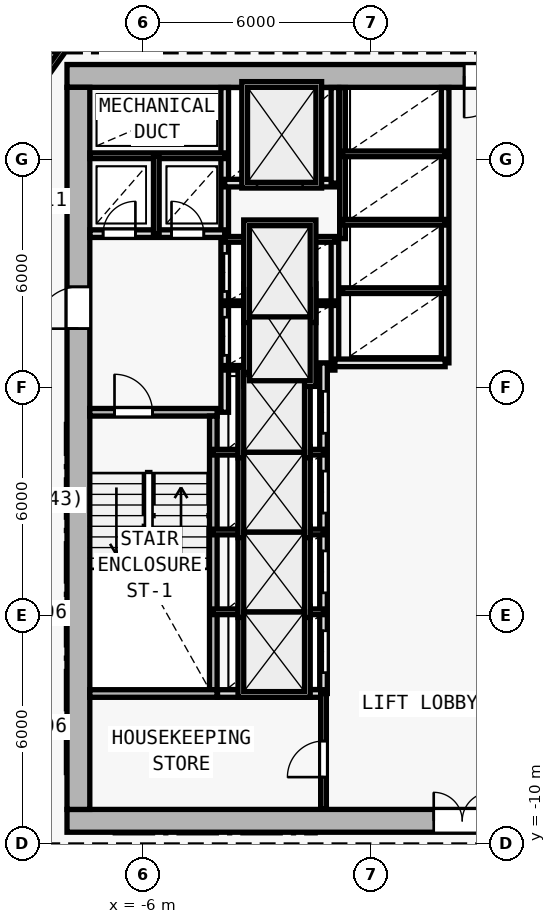
"""IFC4 building model, lengths in metres.
Left out: names, types, materials, properties, quantities, classifications, styles, units other than length and angle.
Written with IfcOpenShell. Run it as: python <this file> out.ifc"""

import sys

from ifc_helpers import new_model, si_unit, direction, frame, frame_2d, origin, origin_2d, place, context, subcontext, project, spatial, rectangle, i_section, extrude, element, fill, save


model = new_model("IFC4")
c1 = context("Model", 3, precision=1e-05, world=origin(), true_north=direction((0.0, 1.0)))
c2 = subcontext(c1, "Body", "Model", "MODEL_VIEW")
j1 = project(units=[si_unit("LENGTHUNIT", "METRE"), si_unit("PLANEANGLEUNIT", "RADIAN")], contexts=[c1])
p1 = place(None, origin())
s1 = spatial("IfcSite", under=j1, at=p1, CompositionType="ELEMENT")
p2 = place(p1, origin())
s2 = spatial("IfcBuilding", under=s1, at=p2, CompositionType="ELEMENT")
p3 = place(p2, frame((0.0, 0.0, 96.9)))
s3 = spatial("IfcBuildingStorey", under=s2, at=p3, CompositionType="ELEMENT", Elevation=96.9)
for number, where, z_axis, x_axis in (
    (1, (-7.7, -9.4, 0.0), (0.0, 0.0, 1.0), (1.0, 0.0, 0.0)),
    (2, (-7.7, 10.2, 0.0), (0.0, 0.0, 1.0), (1.0, 0.0, 0.0)),
    (3, (0.0, -9.4, 0.0), (0.0, 0.0, 1.0), (1.0, 0.0, 0.0)),
    (4, (-7.7, 2.0, 0.0), (0.0, 0.0, 1.0), (1.0, 0.0, 0.0)),
):
    element("IfcColumn", number, at=place(p3, frame(where, z_axis=z_axis, x_axis=x_axis)), inside=s3, PredefinedType="COLUMN", context=c2, shape_type="SweptSolid", body=[
        extrude(i_section(OverallWidth=0.409, OverallDepth=0.425, WebThickness=0.021, FlangeThickness=0.034, FilletRadius=0.015, at=origin_2d()), origin(), (0.0, 0.0, 1.0), 3.6),
    ])
p4 = place(p3, frame((-8.0, -9.4, 0.0), z_axis=(0.0, 0.0, 1.0), x_axis=(1.0, 0.0, 0.0)))
e5 = element("IfcWall", 5, at=p4, inside=s3, PredefinedType="SHEAR", context=c2, shape_type="SweptSolid", body=[
    extrude(rectangle(XDim=16.0, YDim=0.6, at=frame_2d((8.0, 0.0))), origin(), (0.0, 0.0, 1.0), 3.35),
])
p5 = place(p4, frame((9.65, 0.0, 0.0)))
e6 = element("IfcOpeningElement", 6, at=p5, cuts=e5, PredefinedType="OPENING", context=c2, shape_type="SweptSolid", body=[
    extrude(rectangle(XDim=1.5, YDim=2.2, at=frame_2d((0.75, 1.1))), frame((0.0, 0.31, 0.0), z_axis=(0.0, -1.0, 0.0), x_axis=(1.0, 0.0, 0.0)), (0.0, 0.0, 1.0), 0.62),
])
p6 = place(p3, frame((8.0, 10.2, 0.0), z_axis=(0.0, 0.0, 1.0), x_axis=(-1.0, 0.0, 0.0)))
e7 = element("IfcWall", 7, at=p6, inside=s3, PredefinedType="SHEAR", context=c2, shape_type="SweptSolid", body=[
    extrude(rectangle(XDim=16.0, YDim=0.6, at=frame_2d((8.0, 0.0))), origin(), (0.0, 0.0, 1.0), 3.35),
])
p7 = place(p6, frame((4.45, 0.0, 0.0)))
e8 = element("IfcOpeningElement", 8, at=p7, cuts=e7, PredefinedType="OPENING", context=c2, shape_type="SweptSolid", body=[
    extrude(rectangle(XDim=1.1, YDim=2.15, at=frame_2d((0.55, 1.075))), frame((0.0, 0.31, 0.0), z_axis=(0.0, -1.0, 0.0), x_axis=(1.0, 0.0, 0.0)), (0.0, 0.0, 1.0), 0.62),
])
p8 = place(p3, frame((-7.7, -9.1, 0.0), z_axis=(0.0, 0.0, 1.0), x_axis=(0.0, 1.0, 0.0)))
e9 = element("IfcWall", 9, at=p8, inside=s3, PredefinedType="SHEAR", context=c2, shape_type="SweptSolid", body=[
    extrude(rectangle(XDim=19.0, YDim=0.6, at=frame_2d((9.5, 0.0))), origin(), (0.0, 0.0, 1.0), 3.35),
])
p9 = place(p8, frame((12.65, 0.0, 0.0)))
e10 = element("IfcOpeningElement", 10, at=p9, cuts=e9, PredefinedType="OPENING", context=c2, shape_type="SweptSolid", body=[
    extrude(rectangle(XDim=1.1, YDim=2.15, at=frame_2d((0.55, 1.075))), frame((0.0, 0.31, 0.0), z_axis=(0.0, -1.0, 0.0), x_axis=(1.0, 0.0, 0.0)), (0.0, 0.0, 1.0), 0.62),
])
p10 = place(p3, frame((-7.4, 1.35, 0.0), z_axis=(0.0, 0.0, 1.0), x_axis=(1.0, 0.0, 0.0)))
e11 = element("IfcWall", 11, at=p10, inside=s3, PredefinedType="SOLIDWALL", context=c2, shape_type="SweptSolid", body=[
    extrude(rectangle(XDim=3.35, YDim=0.2, at=frame_2d((1.675, 0.0))), origin(), (0.0, 0.0, 1.0), 3.35),
])
p11 = place(p10, frame((0.65, 0.0, 0.0)))
e12 = element("IfcOpeningElement", 12, at=p11, cuts=e11, PredefinedType="OPENING", context=c2, shape_type="SweptSolid", body=[
    extrude(rectangle(XDim=1.0, YDim=2.15, at=frame_2d((0.5, 1.075))), frame((0.0, 0.11, 0.0), z_axis=(0.0, -1.0, 0.0), x_axis=(1.0, 0.0, 0.0)), (0.0, 0.0, 1.0), 0.22),
])
p12 = place(p3, frame((-4.15, -5.95, 0.0), z_axis=(0.0, 0.0, 1.0), x_axis=(0.0, 1.0, 0.0)))
e13 = element("IfcWall", 13, at=p12, inside=s3, PredefinedType="SOLIDWALL", context=c2, shape_type="SweptSolid", body=[
    extrude(rectangle(XDim=7.2, YDim=0.2, at=frame_2d((3.6, 0.0))), origin(), (0.0, 0.0, 1.0), 3.35),
])
p13 = place(p3, frame((-3.85, 1.35, 0.0), z_axis=(0.0, 0.0, 1.0), x_axis=(0.0, 1.0, 0.0)))
e14 = element("IfcWall", 14, at=p13, inside=s3, PredefinedType="SOLIDWALL", context=c2, shape_type="SweptSolid", body=[
    extrude(rectangle(XDim=8.545, YDim=0.2, at=frame_2d((4.272, 0.0))), origin(), (0.0, 0.0, 1.0), 3.35),
])
p14 = place(p13, frame((1.5, 0.0, 0.0)))
e15 = element("IfcOpeningElement", 15, at=p14, cuts=e14, PredefinedType="OPENING", context=c2, shape_type="SweptSolid", body=[
    extrude(rectangle(XDim=1.0, YDim=2.15, at=frame_2d((0.5, 1.075))), frame((0.0, 0.11, 0.0), z_axis=(0.0, -1.0, 0.0), x_axis=(1.0, 0.0, 0.0)), (0.0, 0.0, 1.0), 0.22),
])
p15 = place(p13, frame((3.18, 0.0, 0.0)))
e16 = element("IfcOpeningElement", 16, at=p15, cuts=e14, PredefinedType="OPENING", context=c2, shape_type="SweptSolid", body=[
    extrude(rectangle(XDim=1.0, YDim=2.15, at=frame_2d((0.5, 1.075))), frame((0.0, 0.11, 0.0), z_axis=(0.0, -1.0, 0.0), x_axis=(1.0, 0.0, 0.0)), (0.0, 0.0, 1.0), 0.22),
])
p16 = place(p3, frame((-7.395, 6.05, 0.0), z_axis=(0.0, 0.0, 1.0), x_axis=(1.0, 0.0, 0.0)))
e17 = element("IfcWall", 17, at=p16, inside=s3, PredefinedType="SOLIDWALL", context=c2, shape_type="SweptSolid", body=[
    extrude(rectangle(XDim=3.545, YDim=0.2, at=frame_2d((1.772, 0.0))), origin(), (0.0, 0.0, 1.0), 3.35),
])
p17 = place(p16, frame((0.345, 0.0, 0.0)))
e18 = element("IfcOpeningElement", 18, at=p17, cuts=e17, PredefinedType="OPENING", context=c2, shape_type="SweptSolid", body=[
    extrude(rectangle(XDim=0.85, YDim=2.1, at=frame_2d((0.425, 1.05))), frame((0.0, 0.11, 0.0), z_axis=(0.0, -1.0, 0.0), x_axis=(1.0, 0.0, 0.0)), (0.0, 0.0, 1.0), 0.22),
])
p18 = place(p16, frame((2.145, 0.0, 0.0)))
e19 = element("IfcOpeningElement", 19, at=p18, cuts=e17, PredefinedType="OPENING", context=c2, shape_type="SweptSolid", body=[
    extrude(rectangle(XDim=0.85, YDim=2.1, at=frame_2d((0.425, 1.05))), frame((0.0, 0.11, 0.0), z_axis=(0.0, -1.0, 0.0), x_axis=(1.0, 0.0, 0.0)), (0.0, 0.0, 1.0), 0.22),
])
p19 = place(p3, frame((-7.395, 8.1, 0.0), z_axis=(0.0, 0.0, 1.0), x_axis=(1.0, 0.0, 0.0)))
e20 = element("IfcWall", 20, at=p19, inside=s3, PredefinedType="PARTITIONING", context=c2, shape_type="SweptSolid", body=[
    extrude(rectangle(XDim=3.545, YDim=0.15, at=frame_2d((1.772, 0.0))), origin(), (0.0, 0.0, 1.0), 3.35),
])
p20 = place(p3, frame((-5.65, 6.05, 0.0), z_axis=(0.0, 0.0, 1.0), x_axis=(0.0, 1.0, 0.0)))
e21 = element("IfcWall", 21, at=p20, inside=s3, PredefinedType="PARTITIONING", context=c2, shape_type="SweptSolid", body=[
    extrude(rectangle(XDim=2.05, YDim=0.15, at=frame_2d((1.025, 0.0))), origin(), (0.0, 0.0, 1.0), 3.35),
])
p21 = place(p3, frame((-0.95, 2.65, 0.0), z_axis=(0.0, 0.0, 1.0), x_axis=(0.0, 1.0, 0.0)))
e22 = element("IfcWall", 22, at=p21, inside=s3, PredefinedType="SOLIDWALL", context=c2, shape_type="SweptSolid", body=[
    extrude(rectangle(XDim=3.27, YDim=0.2, at=frame_2d((1.635, 0.0))), origin(), (0.0, 0.0, 1.0), 3.35),
])
for number, where, z_axis, x_axis in (
    (23, (-3.85, 2.52, 0.0), (0.0, 0.0, 1.0), (1.0, 0.0, 0.0)),
    (24, (-3.85, 4.22, 0.0), (0.0, 0.0, 1.0), (1.0, 0.0, 0.0)),
):
    element("IfcWall", number, at=place(p3, frame(where, z_axis=z_axis, x_axis=x_axis)), inside=s3, PredefinedType="PARTITIONING", context=c2, shape_type="SweptSolid", body=[
        extrude(rectangle(XDim=2.9, YDim=0.12, at=frame_2d((1.45, 0.0))), origin(), (0.0, 0.0, 1.0), 3.35),
    ])
p22 = place(p3, frame((-3.85, 5.9, 0.0), z_axis=(0.0, 0.0, 1.0), x_axis=(1.0, 0.0, 0.0)))
e25 = element("IfcWall", 25, at=p22, inside=s3, PredefinedType="PARTITIONING", context=c2, shape_type="SweptSolid", body=[
    extrude(rectangle(XDim=2.9, YDim=0.15, at=frame_2d((1.45, 0.0))), origin(), (0.0, 0.0, 1.0), 3.35),
])
p23 = place(p3, frame((-3.85, 7.38, 0.0), z_axis=(0.0, 0.0, 1.0), x_axis=(1.0, 0.0, 0.0)))
e26 = element("IfcWall", 26, at=p23, inside=s3, PredefinedType="SOLIDWALL", context=c2, shape_type="SweptSolid", body=[
    extrude(rectangle(XDim=2.9, YDim=0.2, at=frame_2d((1.45, 0.0))), origin(), (0.0, 0.0, 1.0), 3.35),
])
p24 = place(p23, frame((0.85, 0.0, 0.0)))
e27 = element("IfcOpeningElement", 27, at=p24, cuts=e26, PredefinedType="OPENING", context=c2, shape_type="SweptSolid", body=[
    extrude(rectangle(XDim=1.2, YDim=2.2, at=frame_2d((0.6, 1.1))), frame((0.0, 0.11, 0.0), z_axis=(0.0, -1.0, 0.0), x_axis=(1.0, 0.0, 0.0)), (0.0, 0.0, 1.0), 0.22),
])
p25 = place(p3, frame((-0.95, 7.38, 0.0), z_axis=(0.0, 0.0, 1.0), x_axis=(0.0, 1.0, 0.0)))
e28 = element("IfcWall", 28, at=p25, inside=s3, PredefinedType="SOLIDWALL", context=c2, shape_type="SweptSolid", body=[
    extrude(rectangle(XDim=2.515, YDim=0.2, at=frame_2d((1.258, 0.0))), origin(), (0.0, 0.0, 1.0), 3.35),
])
p26 = place(p3, frame((-1.25, -6.05, 0.0), z_axis=(0.0, 0.0, 1.0), x_axis=(0.0, 1.0, 0.0)))
e29 = element("IfcWall", 29, at=p26, inside=s3, PredefinedType="SOLIDWALL", context=c2, shape_type="SweptSolid", body=[
    extrude(rectangle(XDim=8.7, YDim=0.2, at=frame_2d((4.35, 0.0))), origin(), (0.0, 0.0, 1.0), 3.35),
])
p27 = place(p26, frame((0.55, 0.0, 0.0)))
e30 = element("IfcOpeningElement", 30, at=p27, cuts=e29, PredefinedType="OPENING", context=c2, shape_type="SweptSolid", body=[
    extrude(rectangle(XDim=1.1, YDim=2.15, at=frame_2d((0.55, 1.075))), frame((0.0, 0.11, 0.0), z_axis=(0.0, -1.0, 0.0), x_axis=(1.0, 0.0, 0.0)), (0.0, 0.0, 1.0), 0.22),
])
p28 = place(p26, frame((2.65, 0.0, 0.0)))
e31 = element("IfcOpeningElement", 31, at=p28, cuts=e29, PredefinedType="OPENING", context=c2, shape_type="SweptSolid", body=[
    extrude(rectangle(XDim=1.1, YDim=2.15, at=frame_2d((0.55, 1.075))), frame((0.0, 0.11, 0.0), z_axis=(0.0, -1.0, 0.0), x_axis=(1.0, 0.0, 0.0)), (0.0, 0.0, 1.0), 0.22),
])
p29 = place(p26, frame((4.75, 0.0, 0.0)))
e32 = element("IfcOpeningElement", 32, at=p29, cuts=e29, PredefinedType="OPENING", context=c2, shape_type="SweptSolid", body=[
    extrude(rectangle(XDim=1.1, YDim=2.15, at=frame_2d((0.55, 1.075))), frame((0.0, 0.11, 0.0), z_axis=(0.0, -1.0, 0.0), x_axis=(1.0, 0.0, 0.0)), (0.0, 0.0, 1.0), 0.22),
])
p30 = place(p26, frame((6.85, 0.0, 0.0)))
e33 = element("IfcOpeningElement", 33, at=p30, cuts=e29, PredefinedType="OPENING", context=c2, shape_type="SweptSolid", body=[
    extrude(rectangle(XDim=1.1, YDim=2.15, at=frame_2d((0.55, 1.075))), frame((0.0, 0.11, 0.0), z_axis=(0.0, -1.0, 0.0), x_axis=(1.0, 0.0, 0.0)), (0.0, 0.0, 1.0), 0.22),
])
for number, where, z_axis, x_axis in (
    (34, (-4.15, -3.9, 0.0), (0.0, 0.0, 1.0), (1.0, 0.0, 0.0)),
    (35, (-4.15, -1.8, 0.0), (0.0, 0.0, 1.0), (1.0, 0.0, 0.0)),
    (36, (-4.15, 0.3, 0.0), (0.0, 0.0, 1.0), (1.0, 0.0, 0.0)),
):
    element("IfcWall", number, at=place(p3, frame(where, z_axis=z_axis, x_axis=x_axis)), inside=s3, PredefinedType="PARTITIONING", context=c2, shape_type="SweptSolid", body=[
        extrude(rectangle(XDim=2.9, YDim=0.15, at=frame_2d((1.45, 0.0))), origin(), (0.0, 0.0, 1.0), 3.35),
    ])
p31 = place(p3, frame((1.95, 2.65, 0.0), z_axis=(0.0, 0.0, 1.0), x_axis=(0.0, 1.0, 0.0)))
e37 = element("IfcWall", 37, at=p31, inside=s3, PredefinedType="SOLIDWALL", context=c2, shape_type="SweptSolid", body=[
    extrude(rectangle(XDim=7.245, YDim=0.2, at=frame_2d((3.623, 0.0))), origin(), (0.0, 0.0, 1.0), 3.35),
])
p32 = place(p3, frame((-0.95, 2.65, 0.0), z_axis=(0.0, 0.0, 1.0), x_axis=(1.0, 0.0, 0.0)))
e38 = element("IfcWall", 38, at=p32, inside=s3, PredefinedType="SOLIDWALL", context=c2, shape_type="SweptSolid", body=[
    extrude(rectangle(XDim=2.9, YDim=0.2, at=frame_2d((1.45, 0.0))), origin(), (0.0, 0.0, 1.0), 3.35),
])
p33 = place(p3, frame((-0.75, 5.92, 0.0), z_axis=(0.0, 0.0, 1.0), x_axis=(0.0, 1.0, 0.0)))
e39 = element("IfcWall", 39, at=p33, inside=s3, PredefinedType="PARTITIONING", context=c2, shape_type="SweptSolid", body=[
    extrude(rectangle(XDim=3.975, YDim=0.15, at=frame_2d((1.988, 0.0))), origin(), (0.0, 0.0, 1.0), 3.35),
])
for number, where, z_axis, x_axis in (
    (40, (-0.75, 4.55, 0.0), (0.0, 0.0, 1.0), (1.0, 0.0, 0.0)),
    (41, (-0.75, 6.35, 0.0), (0.0, 0.0, 1.0), (1.0, 0.0, 0.0)),
    (42, (-0.75, 8.15, 0.0), (0.0, 0.0, 1.0), (1.0, 0.0, 0.0)),
):
    element("IfcWall", number, at=place(p3, frame(where, z_axis=z_axis, x_axis=x_axis)), inside=s3, PredefinedType="PARTITIONING", context=c2, shape_type="SweptSolid", body=[
        extrude(rectangle(XDim=2.7, YDim=0.15, at=frame_2d((1.35, 0.0))), origin(), (0.0, 0.0, 1.0), 3.35),
    ])
p34 = place(p3, frame((-7.4, -6.05, 0.0), z_axis=(0.0, 0.0, 1.0), x_axis=(1.0, 0.0, 0.0)))
e43 = element("IfcWall", 43, at=p34, inside=s3, PredefinedType="SOLIDWALL", context=c2, shape_type="SweptSolid", body=[
    extrude(rectangle(XDim=3.35, YDim=0.2, at=frame_2d((1.675, 0.0))), origin(), (0.0, 0.0, 1.0), 3.35),
])
p35 = place(p3, frame((-4.04, -6.05, 0.0), z_axis=(0.0, 0.0, 1.0), x_axis=(1.0, 0.0, 0.0)))
e44 = element("IfcWall", 44, at=p35, inside=s3, PredefinedType="SOLIDWALL", context=c2, shape_type="SweptSolid", body=[
    extrude(rectangle(XDim=2.79, YDim=0.2, at=frame_2d((1.395, 0.0))), origin(), (0.0, 0.0, 1.0), 3.35),
])
p36 = place(p3, frame((-1.25, -9.095, 0.0), z_axis=(0.0, 0.0, 1.0), x_axis=(0.0, 1.0, 0.0)))
e45 = element("IfcWall", 45, at=p36, inside=s3, PredefinedType="PARTITIONING", context=c2, shape_type="SweptSolid", body=[
    extrude(rectangle(XDim=3.045, YDim=0.15, at=frame_2d((1.522, 0.0))), origin(), (0.0, 0.0, 1.0), 3.35),
])
p37 = place(p36, frame((0.845, 0.0, 0.0)))
e46 = element("IfcOpeningElement", 46, at=p37, cuts=e45, PredefinedType="OPENING", context=c2, shape_type="SweptSolid", body=[
    extrude(rectangle(XDim=0.95, YDim=2.1, at=frame_2d((0.475, 1.05))), frame((0.0, 0.085, 0.0), z_axis=(0.0, -1.0, 0.0), x_axis=(1.0, 0.0, 0.0)), (0.0, 0.0, 1.0), 0.17),
])
p38 = place(p3, frame((-9.86, 8.426, 0.0), z_axis=(0.0, 0.0, 1.0), x_axis=(0.582449511476, 0.812866881218, 0.0)))
e47 = element("IfcWall", 47, at=p38, inside=s3, PredefinedType="PARTITIONING", context=c2, shape_type="SweptSolid", body=[
    extrude(rectangle(XDim=4.84, YDim=0.15, at=frame_2d((2.42, 0.0))), origin(), (0.0, 0.0, 1.0), 2.925),
])
p39 = place(p38, frame((3.046, 0.0, 0.0)))
e48 = element("IfcOpeningElement", 48, at=p39, cuts=e47, PredefinedType="OPENING", context=c2, shape_type="SweptSolid", body=[
    extrude(rectangle(XDim=0.9, YDim=2.1, at=frame_2d((0.45, 1.05))), frame((0.0, 0.085, 0.0), z_axis=(0.0, -1.0, 0.0), x_axis=(1.0, 0.0, 0.0)), (0.0, 0.0, 1.0), 0.17),
])
p40 = place(p5, origin())
e49 = element("IfcDoor", 49, at=p40, inside=s3, OperationType="DOUBLE_DOOR_SINGLE_SWING", PredefinedType="DOOR", context=c2, shape_type="SweptSolid", body=[
    extrude(rectangle(XDim=1.5, YDim=2.2, at=frame_2d((0.75, 1.1))), frame((0.0, 0.025, 0.0), z_axis=(0.0, -1.0, 0.0), x_axis=(1.0, 0.0, 0.0)), (0.0, 0.0, 1.0), 0.05),
])
fill(e6, e49)
p41 = place(p9, origin())
e50 = element("IfcDoor", 50, at=p41, inside=s3, OperationType="SINGLE_SWING_LEFT", PredefinedType="DOOR", context=c2, shape_type="SweptSolid", body=[
    extrude(rectangle(XDim=1.1, YDim=2.15, at=frame_2d((0.55, 1.075))), frame((0.0, 0.025, 0.0), z_axis=(0.0, -1.0, 0.0), x_axis=(1.0, 0.0, 0.0)), (0.0, 0.0, 1.0), 0.05),
])
fill(e10, e50)
p42 = place(p7, origin())
e51 = element("IfcDoor", 51, at=p42, inside=s3, OperationType="SINGLE_SWING_RIGHT", PredefinedType="DOOR", context=c2, shape_type="SweptSolid", body=[
    extrude(rectangle(XDim=1.1, YDim=2.15, at=frame_2d((0.55, 1.075))), frame((0.0, 0.025, 0.0), z_axis=(0.0, -1.0, 0.0), x_axis=(1.0, 0.0, 0.0)), (0.0, 0.0, 1.0), 0.05),
])
fill(e8, e51)
p43 = place(p11, origin())
e52 = element("IfcDoor", 52, at=p43, inside=s3, OperationType="SINGLE_SWING_LEFT", PredefinedType="DOOR", context=c2, shape_type="SweptSolid", body=[
    extrude(rectangle(XDim=1.0, YDim=2.15, at=frame_2d((0.5, 1.075))), frame((0.0, 0.025, 0.0), z_axis=(0.0, -1.0, 0.0), x_axis=(1.0, 0.0, 0.0)), (0.0, 0.0, 1.0), 0.05),
])
fill(e12, e52)
p44 = place(p17, origin())
e53 = element("IfcDoor", 53, at=p44, inside=s3, OperationType="SINGLE_SWING_RIGHT", PredefinedType="DOOR", context=c2, shape_type="SweptSolid", body=[
    extrude(rectangle(XDim=0.85, YDim=2.1, at=frame_2d((0.425, 1.05))), frame((0.0, 0.025, 0.0), z_axis=(0.0, -1.0, 0.0), x_axis=(1.0, 0.0, 0.0)), (0.0, 0.0, 1.0), 0.05),
])
fill(e18, e53)
p45 = place(p18, origin())
e54 = element("IfcDoor", 54, at=p45, inside=s3, OperationType="SINGLE_SWING_LEFT", PredefinedType="DOOR", context=c2, shape_type="SweptSolid", body=[
    extrude(rectangle(XDim=0.85, YDim=2.1, at=frame_2d((0.425, 1.05))), frame((0.0, 0.025, 0.0), z_axis=(0.0, -1.0, 0.0), x_axis=(1.0, 0.0, 0.0)), (0.0, 0.0, 1.0), 0.05),
])
fill(e19, e54)
p46 = place(p24, origin())
e55 = element("IfcDoor", 55, at=p46, inside=s3, OperationType="DOUBLE_DOOR_SLIDING", PredefinedType="DOOR", context=c2, shape_type="SweptSolid", body=[
    extrude(rectangle(XDim=1.2, YDim=2.2, at=frame_2d((0.6, 1.1))), frame((0.0, 0.025, 0.0), z_axis=(0.0, -1.0, 0.0), x_axis=(1.0, 0.0, 0.0)), (0.0, 0.0, 1.0), 0.05),
])
fill(e27, e55)
p47 = place(p27, origin())
e56 = element("IfcDoor", 56, at=p47, inside=s3, OperationType="DOUBLE_DOOR_SLIDING", PredefinedType="DOOR", context=c2, shape_type="SweptSolid", body=[
    extrude(rectangle(XDim=1.1, YDim=2.15, at=frame_2d((0.55, 1.075))), frame((0.0, 0.025, 0.0), z_axis=(0.0, -1.0, 0.0), x_axis=(1.0, 0.0, 0.0)), (0.0, 0.0, 1.0), 0.05),
])
fill(e30, e56)
p48 = place(p28, origin())
e57 = element("IfcDoor", 57, at=p48, inside=s3, OperationType="DOUBLE_DOOR_SLIDING", PredefinedType="DOOR", context=c2, shape_type="SweptSolid", body=[
    extrude(rectangle(XDim=1.1, YDim=2.15, at=frame_2d((0.55, 1.075))), frame((0.0, 0.025, 0.0), z_axis=(0.0, -1.0, 0.0), x_axis=(1.0, 0.0, 0.0)), (0.0, 0.0, 1.0), 0.05),
])
fill(e31, e57)
p49 = place(p29, origin())
e58 = element("IfcDoor", 58, at=p49, inside=s3, OperationType="DOUBLE_DOOR_SLIDING", PredefinedType="DOOR", context=c2, shape_type="SweptSolid", body=[
    extrude(rectangle(XDim=1.1, YDim=2.15, at=frame_2d((0.55, 1.075))), frame((0.0, 0.025, 0.0), z_axis=(0.0, -1.0, 0.0), x_axis=(1.0, 0.0, 0.0)), (0.0, 0.0, 1.0), 0.05),
])
fill(e32, e58)
p50 = place(p30, origin())
e59 = element("IfcDoor", 59, at=p50, inside=s3, OperationType="DOUBLE_DOOR_SLIDING", PredefinedType="DOOR", context=c2, shape_type="SweptSolid", body=[
    extrude(rectangle(XDim=1.1, YDim=2.15, at=frame_2d((0.55, 1.075))), frame((0.0, 0.025, 0.0), z_axis=(0.0, -1.0, 0.0), x_axis=(1.0, 0.0, 0.0)), (0.0, 0.0, 1.0), 0.05),
])
fill(e33, e59)
p51 = place(p14, origin())
e60 = element("IfcDoor", 60, at=p51, inside=s3, OperationType="DOUBLE_DOOR_SLIDING", PredefinedType="DOOR", context=c2, shape_type="SweptSolid", body=[
    extrude(rectangle(XDim=1.0, YDim=2.15, at=frame_2d((0.5, 1.075))), frame((0.0, 0.025, 0.0), z_axis=(0.0, -1.0, 0.0), x_axis=(1.0, 0.0, 0.0)), (0.0, 0.0, 1.0), 0.05),
])
fill(e15, e60)
p52 = place(p15, origin())
e61 = element("IfcDoor", 61, at=p52, inside=s3, OperationType="DOUBLE_DOOR_SLIDING", PredefinedType="DOOR", context=c2, shape_type="SweptSolid", body=[
    extrude(rectangle(XDim=1.0, YDim=2.15, at=frame_2d((0.5, 1.075))), frame((0.0, 0.025, 0.0), z_axis=(0.0, -1.0, 0.0), x_axis=(1.0, 0.0, 0.0)), (0.0, 0.0, 1.0), 0.05),
])
fill(e16, e61)
p53 = place(p37, origin())
e62 = element("IfcDoor", 62, at=p53, inside=s3, OperationType="SINGLE_SWING_LEFT", PredefinedType="DOOR", context=c2, shape_type="SweptSolid", body=[
    extrude(rectangle(XDim=0.95, YDim=2.1, at=frame_2d((0.475, 1.05))), frame((0.0, 0.025, 0.0), z_axis=(0.0, -1.0, 0.0), x_axis=(1.0, 0.0, 0.0)), (0.0, 0.0, 1.0), 0.05),
])
fill(e46, e62)
save(model, sys.argv[1])
